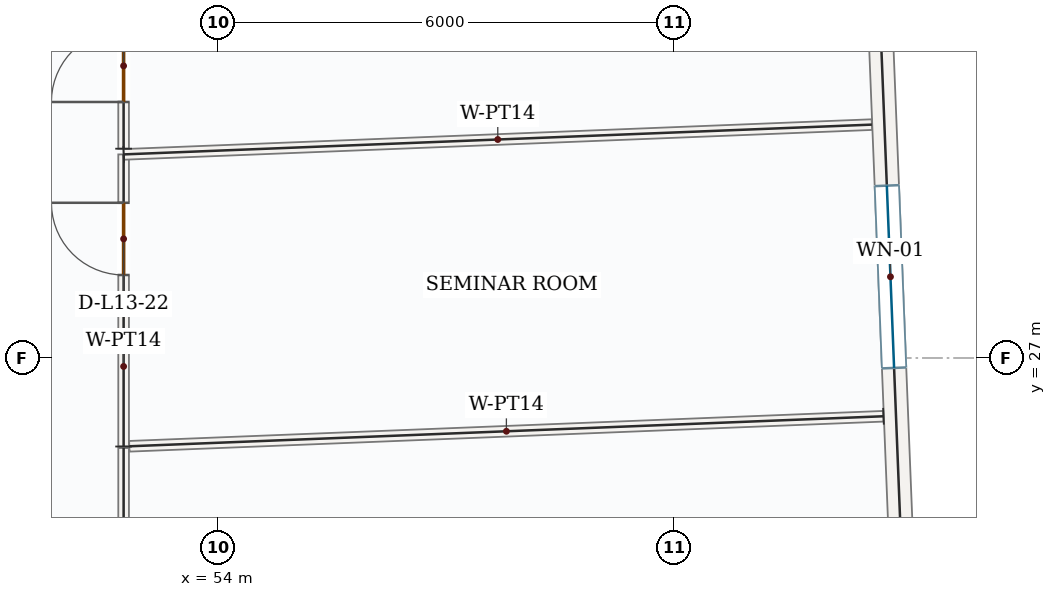
"""IFC4 building model, lengths in metres.
Left out: names, types, materials, properties, quantities, classifications, styles, units other than length and angle.
Written with IfcOpenShell. Run it as: python <this file> out.ifc"""

import sys

from ifc_helpers import new_model, si_unit, direction, frame, frame_2d, origin, place, context, subcontext, project, spatial, rectangle, extrude, source, transform, mapped, element, fill, save


model = new_model("IFC4")
c1 = context("Model", 3, precision=1e-05, world=origin(), true_north=direction((0.0, 1.0)))
c2 = subcontext(c1, "Body", "Model", "MODEL_VIEW")
j1 = project(units=[si_unit("LENGTHUNIT", "METRE"), si_unit("PLANEANGLEUNIT", "RADIAN")], contexts=[c1])
p1 = place(None, origin())
s1 = spatial("IfcSite", under=j1, at=p1, CompositionType="ELEMENT")
p2 = place(p1, origin())
s2 = spatial("IfcBuilding", under=s1, at=p2, CompositionType="ELEMENT")
p3 = place(p2, frame((0.0, 0.0, 62.7)))
s3 = spatial("IfcBuildingStorey", under=s2, at=p3, CompositionType="ELEMENT", Elevation=62.7)
p4 = place(p3, frame((62.641, 33.025, 0.0), z_axis=(0.0, 0.0, 1.0), x_axis=(0.03977146366, -0.999208802342, 0.0)))
e1 = element("IfcWall", 1, at=p4, inside=s3, PredefinedType="SOLIDWALL", context=c2, shape_type="SweptSolid", body=[
    extrude(rectangle(XDim=9.92, YDim=0.32, at=frame_2d((4.96, 0.0))), origin(), (0.0, 0.0, 1.0), 3.95),
])
p5 = place(p4, frame((3.76, 0.0, 0.85)))
e2 = element("IfcOpeningElement", 2, at=p5, cuts=e1, PredefinedType="OPENING", context=c2, shape_type="SweptSolid", body=[
    extrude(rectangle(XDim=2.4, YDim=1.8, at=frame_2d((1.2, 0.9))), frame((0.0, 0.17, 0.0), z_axis=(0.0, -1.0, 0.0), x_axis=(1.0, 0.0, 0.0)), (0.0, 0.0, 1.0), 0.34),
])
p6 = place(p3, frame((52.75, 25.835, 0.0), z_axis=(0.0, 0.0, 1.0), x_axis=(0.0, 1.0, 0.0)))
e3 = element("IfcWall", 3, at=p6, inside=s3, PredefinedType="PARTITIONING", context=c2, shape_type="SweptSolid", body=[
    extrude(rectangle(XDim=3.843, YDim=0.14, at=frame_2d((1.921, 0.0))), origin(), (0.0, 0.0, 1.0), 3.95),
])
p7 = place(p6, frame((2.257, 0.0, 0.0)))
e4 = element("IfcOpeningElement", 4, at=p7, cuts=e3, PredefinedType="OPENING", context=c2, shape_type="SweptSolid", body=[
    extrude(rectangle(XDim=0.95, YDim=2.15, at=frame_2d((0.475, 1.075))), frame((0.0, 0.08, 0.0), z_axis=(0.0, -1.0, 0.0), x_axis=(1.0, 0.0, 0.0)), (0.0, 0.0, 1.0), 0.16),
])
m1 = source(origin(), c2, "Body", "SweptSolid", [
    extrude(rectangle(XDim=9.851, YDim=0.14, at=frame_2d((4.925, 0.0))), origin(), (0.0, 0.0, 1.0), 3.95),
])
p8 = place(p3, frame((52.751, 29.678, 0.0), z_axis=(0.0, 0.0, 1.0), x_axis=(0.999208542072, 0.039778002084, 0.0)))
e5 = element("IfcWall", 5, at=p8, inside=s3, PredefinedType="PARTITIONING", context=c2, shape_type="MappedRepresentation", body=[
    mapped(m1, transform((0.0, 0.0, 0.0), x_axis=(1.0, 0.0, 0.0), y_axis=(0.0, 1.0, 0.0), z_axis=(0.0, 0.0, 1.0), scale=1.0)),
])
m2 = source(origin(), c2, "Body", "SweptSolid", [
    extrude(rectangle(XDim=9.929, YDim=0.14, at=frame_2d((4.965, 0.0))), origin(), (0.0, 0.0, 1.0), 3.95),
])
p9 = place(p3, frame((62.747, 26.233, 0.0), z_axis=(0.0, 0.0, 1.0), x_axis=(-0.999208364847, -0.039782453661, 0.0)))
e6 = element("IfcWall", 6, at=p9, inside=s3, PredefinedType="PARTITIONING", context=c2, shape_type="MappedRepresentation", body=[
    mapped(m2, transform((0.0, 0.0, 0.0), x_axis=(1.0, 0.0, 0.0), y_axis=(0.0, 1.0, 0.0), z_axis=(0.0, 0.0, 1.0), scale=1.0)),
])
p10 = place(p3, frame((52.75, 20.575, 0.0), z_axis=(0.0, 0.0, 1.0), x_axis=(0.0, 1.0, 0.0)))
e7 = element("IfcWall", 7, at=p10, inside=s3, PredefinedType="PARTITIONING", context=c2, shape_type="SweptSolid", body=[
    extrude(rectangle(XDim=5.24, YDim=0.14, at=frame_2d((2.62, 0.0))), origin(), (0.0, 0.0, 1.0), 3.95),
])
p11 = place(p10, frame((2.789, 0.0, 0.0)))
e8 = element("IfcOpeningElement", 8, at=p11, cuts=e7, PredefinedType="OPENING", context=c2, shape_type="SweptSolid", body=[
    extrude(rectangle(XDim=0.95, YDim=2.15, at=frame_2d((0.475, 1.075))), frame((0.0, 0.08, 0.0), z_axis=(0.0, -1.0, 0.0), x_axis=(1.0, 0.0, 0.0)), (0.0, 0.0, 1.0), 0.16),
])
p12 = place(p3, frame((52.75, 29.753, 0.0), z_axis=(0.0, 0.0, 1.0), x_axis=(-0.000326030238, 0.999999946852, 0.0)))
e9 = element("IfcWall", 9, at=p12, inside=s3, PredefinedType="PARTITIONING", context=c2, shape_type="SweptSolid", body=[
    extrude(rectangle(XDim=3.744, YDim=0.14, at=frame_2d((1.872, 0.0))), origin(), (0.0, 0.0, 1.0), 3.95),
])
p13 = place(p12, frame((0.615, 0.0, 0.0)))
e10 = element("IfcOpeningElement", 10, at=p13, cuts=e9, PredefinedType="OPENING", context=c2, shape_type="SweptSolid", body=[
    extrude(rectangle(XDim=0.95, YDim=2.15, at=frame_2d((0.475, 1.075))), frame((0.0, 0.08, 0.0), z_axis=(0.0, -1.0, 0.0), x_axis=(1.0, 0.0, 0.0)), (0.0, 0.0, 1.0), 0.16),
])
m3 = source(origin(), c2, "Body", "SweptSolid", [
    extrude(rectangle(XDim=2.4, YDim=1.8, at=frame_2d((1.2, 0.9))), frame((0.0, 0.03, 0.0), z_axis=(0.0, -1.0, 0.0), x_axis=(1.0, 0.0, 0.0)), (0.0, 0.0, 1.0), 0.06),
])
p14 = place(p5, origin())
e11 = element("IfcWindow", 11, at=p14, inside=s3, PartitioningType="DOUBLE_PANEL_VERTICAL", PredefinedType="WINDOW", context=c2, shape_type="MappedRepresentation", body=[
    mapped(m3, transform((0.0, 0.0, 0.0), x_axis=(1.0, 0.0, 0.0), y_axis=(0.0, 1.0, 0.0), z_axis=(0.0, 0.0, 1.0), scale=1.0)),
])
fill(e2, e11)
m4 = source(origin(), c2, "Body", "SweptSolid", [
    extrude(rectangle(XDim=0.95, YDim=2.15, at=frame_2d((0.475, 1.075))), frame((0.0, 0.025, 0.0), z_axis=(0.0, -1.0, 0.0), x_axis=(1.0, 0.0, 0.0)), (0.0, 0.0, 1.0), 0.05),
])
p15 = place(p7, origin())
e12 = element("IfcDoor", 12, at=p15, inside=s3, OperationType="SINGLE_SWING_RIGHT", PredefinedType="DOOR", context=c2, shape_type="MappedRepresentation", body=[
    mapped(m4, transform((0.0, 0.0, 0.0), x_axis=(1.0, 0.0, 0.0), y_axis=(0.0, 1.0, 0.0), z_axis=(0.0, 0.0, 1.0), scale=1.0)),
])
fill(e4, e12)
p16 = place(p13, origin())
e13 = element("IfcDoor", 13, at=p16, inside=s3, OperationType="SINGLE_SWING_LEFT", PredefinedType="DOOR", context=c2, shape_type="MappedRepresentation", body=[
    mapped(m4, transform((0.0, 0.0, 0.0), x_axis=(1.0, 0.0, 0.0), y_axis=(0.0, 1.0, 0.0), z_axis=(0.0, 0.0, 1.0), scale=1.0)),
])
fill(e10, e13)
save(model, sys.argv[1])
